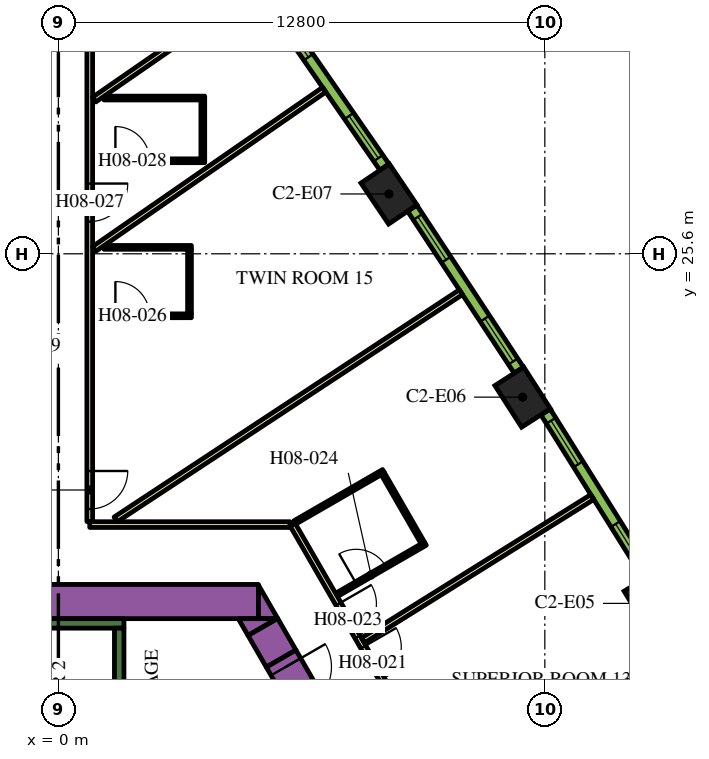
"""IFC4 building model, lengths in metres.
Left out: names, types, materials, properties, quantities, classifications, styles, units other than length and angle.
Written with IfcOpenShell. Run it as: python <this file> out.ifc"""

import sys

from ifc_helpers import new_model, si_unit, direction, frame, frame_2d, origin, origin_2d, place, context, subcontext, project, spatial, polyline, rectangle, outline, extrude, element, fill, save


model = new_model("IFC4")
c1 = context("Model", 3, precision=1e-05, world=origin(), true_north=direction((0.0, 1.0)))
c2 = subcontext(c1, "Body", "Model", "MODEL_VIEW")
j1 = project(units=[si_unit("LENGTHUNIT", "METRE"), si_unit("PLANEANGLEUNIT", "RADIAN")], contexts=[c1])
p1 = place(None, origin())
s1 = spatial("IfcSite", under=j1, at=p1, CompositionType="ELEMENT")
p2 = place(p1, origin())
s2 = spatial("IfcBuilding", under=s1, at=p2, CompositionType="ELEMENT")
p3 = place(p2, frame((0.0, 0.0, 111.0)))
s3 = spatial("IfcBuildingStorey", under=s2, at=p3, CompositionType="ELEMENT", Elevation=111.0)
for number, where, z_axis, x_axis in (
    (1, (15.609, 16.402, 0.0), (0.0, 0.0, 1.0), (-0.52, 0.854, 0.0)),
    (2, (12.217, 21.828, 0.0), (0.0, 0.0, 1.0), (-0.54, 0.842, 0.0)),
    (3, (8.699, 27.174, 0.0), (0.0, 0.0, 1.0), (-0.559, 0.829, 0.0)),
):
    element("IfcColumn", number, at=place(p3, frame(where, z_axis=z_axis, x_axis=x_axis)), inside=s3, PredefinedType="COLUMN", context=c2, shape_type="SweptSolid", body=[
        extrude(rectangle(XDim=1.3, YDim=0.9, at=origin_2d()), origin(), (0.0, 0.0, 1.0), 3.9),
    ])
p4 = place(p3, frame((-4.224, 16.45, 0.0), z_axis=(0.0, 0.0, 1.0), x_axis=(1.0, 0.0, 0.0)))
e4 = element("IfcWall", 4, at=p4, inside=s3, PredefinedType="SOLIDWALL", context=c2, shape_type="SweptSolid", body=[
    extrude(rectangle(XDim=9.488, YDim=0.9, at=frame_2d((4.744, 0.0))), origin(), (0.0, 0.0, 1.0), 3.9),
])
p5 = place(p3, origin())
e5 = element("IfcWall", 5, at=p5, inside=s3, PredefinedType="SOLIDWALL", context=c2, shape_type="SweptSolid", body=[
    extrude(outline(polyline([(5.265, 16.0), (5.265, 16.88), (5.773, 16.0), (5.265, 16.0)])), origin(), (0.0, 0.0, 1.0), 3.9),
])
p6 = place(p3, frame((5.861, 14.949, 0.0), z_axis=(0.0, 0.0, 1.0), x_axis=(-0.50011719232, 0.865957732194, 0.0)))
e6 = element("IfcWall", 6, at=p6, inside=s3, PredefinedType="SOLIDWALL", context=c2, shape_type="SweptSolid", body=[
    extrude(rectangle(XDim=0.964, YDim=0.9, at=frame_2d((0.482, 0.0))), origin(), (0.0, 0.0, 1.0), 3.9),
])
e7 = element("IfcWall", 7, at=p5, inside=s3, PredefinedType="SOLIDWALL", context=c2, shape_type="SweptSolid", body=[
    extrude(outline(polyline([(4.734, 16.0), (5.75, 16.0), (4.988, 15.56), (4.734, 16.0)])), origin(), (0.0, 0.0, 1.0), 3.9),
])
p7 = place(p3, frame((-1.725, 15.875, 0.0), z_axis=(0.0, 0.0, 1.0), x_axis=(1.0, 0.0, 0.0)))
e8 = element("IfcWall", 8, at=p7, inside=s3, PredefinedType="SOLIDWALL", context=c2, shape_type="SweptSolid", body=[
    extrude(rectangle(XDim=3.45, YDim=0.25, at=frame_2d((1.725, 0.0))), origin(), (0.0, 0.0, 1.0), 3.9),
])
p8 = place(p3, frame((1.6, 8.95, 0.0), z_axis=(0.0, 0.0, 1.0), x_axis=(0.0, 1.0, 0.0)))
e9 = element("IfcWall", 9, at=p8, inside=s3, PredefinedType="SOLIDWALL", context=c2, shape_type="SweptSolid", body=[
    extrude(rectangle(XDim=6.8, YDim=0.25, at=frame_2d((3.4, 0.0))), origin(), (0.0, 0.0, 1.0), 3.9),
])
p9 = place(p3, frame((5.861, 14.948, 0.0), z_axis=(0.0, 0.0, 1.0), x_axis=(0.500062241894, -0.865989465428, 0.0)))
e10 = element("IfcWall", 10, at=p9, inside=s3, PredefinedType="SOLIDWALL", context=c2, shape_type="SweptSolid", body=[
    extrude(rectangle(XDim=1.7, YDim=0.9, at=frame_2d((0.85, 0.0))), origin(), (0.0, 0.0, 1.0), 3.9),
])
p10 = place(p9, frame((0.25, 0.0, 0.0)))
e11 = element("IfcOpeningElement", 11, at=p10, cuts=e10, PredefinedType="OPENING", context=c2, shape_type="SweptSolid", body=[
    extrude(rectangle(XDim=1.2, YDim=2.1, at=frame_2d((0.6, 1.05))), frame((0.0, 0.46, 0.0), z_axis=(0.0, -1.0, 0.0), x_axis=(1.0, 0.0, 0.0)), (0.0, 0.0, 1.0), 0.92),
])
p11 = place(p3, frame((6.163, 18.475, 0.0), z_axis=(0.0, 0.0, 1.0), x_axis=(0.500001317485, -0.866024643133, 0.0)))
e12 = element("IfcWall", 12, at=p11, inside=s3, PredefinedType="PARTITIONING", context=c2, shape_type="SweptSolid", body=[
    extrude(rectangle(XDim=25.767, YDim=0.15, at=frame_2d((12.883, 0.0))), origin(), (0.0, 0.0, 1.0), 2.75),
])
p12 = place(p11, frame((24.241, 0.0, 0.0)))
e13 = element("IfcOpeningElement", 13, at=p12, cuts=e12, PredefinedType="OPENING", context=c2, shape_type="SweptSolid", body=[
    extrude(rectangle(XDim=1.0, YDim=2.1, at=frame_2d((0.5, 1.05))), frame((0.0, 0.085, 0.0), z_axis=(0.0, -1.0, 0.0), x_axis=(1.0, 0.0, 0.0)), (0.0, 0.0, 1.0), 0.17),
])
p13 = place(p11, frame((13.144, 0.0, 0.0)))
e14 = element("IfcOpeningElement", 14, at=p13, cuts=e12, PredefinedType="OPENING", context=c2, shape_type="SweptSolid", body=[
    extrude(rectangle(XDim=1.0, YDim=2.1, at=frame_2d((0.5, 1.05))), frame((0.0, 0.085, 0.0), z_axis=(0.0, -1.0, 0.0), x_axis=(1.0, 0.0, 0.0)), (0.0, 0.0, 1.0), 0.17),
])
p14 = place(p11, frame((10.874, 0.0, 0.0)))
e15 = element("IfcOpeningElement", 15, at=p14, cuts=e12, PredefinedType="OPENING", context=c2, shape_type="SweptSolid", body=[
    extrude(rectangle(XDim=0.9, YDim=2.1, at=frame_2d((0.45, 1.05))), frame((0.0, 0.085, 0.0), z_axis=(0.0, -1.0, 0.0), x_axis=(1.0, 0.0, 0.0)), (0.0, 0.0, 1.0), 0.17),
])
p15 = place(p11, frame((3.718, 0.0, 0.0)))
e16 = element("IfcOpeningElement", 16, at=p15, cuts=e12, PredefinedType="OPENING", context=c2, shape_type="SweptSolid", body=[
    extrude(rectangle(XDim=1.0, YDim=2.1, at=frame_2d((0.5, 1.05))), frame((0.0, 0.085, 0.0), z_axis=(0.0, -1.0, 0.0), x_axis=(1.0, 0.0, 0.0)), (0.0, 0.0, 1.0), 0.17),
])
p16 = place(p11, frame((2.411, 0.0, 0.0)))
e17 = element("IfcOpeningElement", 17, at=p16, cuts=e12, PredefinedType="OPENING", context=c2, shape_type="SweptSolid", body=[
    extrude(rectangle(XDim=1.0, YDim=2.1, at=frame_2d((0.5, 1.05))), frame((0.0, 0.085, 0.0), z_axis=(0.0, -1.0, 0.0), x_axis=(1.0, 0.0, 0.0)), (0.0, 0.0, 1.0), 0.17),
])
p17 = place(p3, frame((0.825, 18.475, 0.0), z_axis=(0.0, 0.0, 1.0), x_axis=(1.0, 0.0, 0.0)))
e18 = element("IfcWall", 18, at=p17, inside=s3, PredefinedType="PARTITIONING", context=c2, shape_type="SweptSolid", body=[
    extrude(rectangle(XDim=5.268, YDim=0.15, at=frame_2d((2.634, 0.0))), origin(), (0.0, 0.0, 1.0), 2.75),
])
p18 = place(p3, frame((0.825, 32.098, 0.0), z_axis=(0.0, 0.0, 1.0), x_axis=(0.0, -1.0, 0.0)))
e19 = element("IfcWall", 19, at=p18, inside=s3, PredefinedType="PARTITIONING", context=c2, shape_type="SweptSolid", body=[
    extrude(rectangle(XDim=13.543, YDim=0.15, at=frame_2d((6.772, 0.0))), origin(), (0.0, 0.0, 1.0), 2.75),
])
p19 = place(p18, frame((12.213, 0.0, 0.0)))
e20 = element("IfcOpeningElement", 20, at=p19, cuts=e19, PredefinedType="OPENING", context=c2, shape_type="SweptSolid", body=[
    extrude(rectangle(XDim=1.0, YDim=2.1, at=frame_2d((0.5, 1.05))), frame((0.0, 0.085, 0.0), z_axis=(0.0, -1.0, 0.0), x_axis=(1.0, 0.0, 0.0)), (0.0, 0.0, 1.0), 0.17),
])
p20 = place(p18, frame((4.65, 0.0, 0.0)))
e21 = element("IfcOpeningElement", 21, at=p20, cuts=e19, PredefinedType="OPENING", context=c2, shape_type="SweptSolid", body=[
    extrude(rectangle(XDim=1.0, YDim=2.1, at=frame_2d((0.5, 1.05))), frame((0.0, 0.085, 0.0), z_axis=(0.0, -1.0, 0.0), x_axis=(1.0, 0.0, 0.0)), (0.0, 0.0, 1.0), 0.17),
])
p21 = place(p3, frame((6.994, 29.917, 0.0), z_axis=(0.0, 0.0, 1.0), x_axis=(-0.822255462494, -0.569118576747, 0.0)))
e22 = element("IfcWall", 22, at=p21, inside=s3, PredefinedType="PARTITIONING", context=c2, shape_type="SweptSolid", body=[
    extrude(rectangle(XDim=7.362, YDim=0.15, at=frame_2d((3.681, 0.0))), origin(), (0.0, 0.0, 1.0), 2.75),
])
p22 = place(p3, frame((10.592, 24.589, 0.0), z_axis=(0.0, 0.0, 1.0), x_axis=(-0.835337323748, -0.549737715236, 0.0)))
e23 = element("IfcWall", 23, at=p22, inside=s3, PredefinedType="PARTITIONING", context=c2, shape_type="SweptSolid", body=[
    extrude(rectangle(XDim=10.875, YDim=0.15, at=frame_2d((5.438, 0.0))), origin(), (0.0, 0.0, 1.0), 2.75),
])
p23 = place(p3, frame((4.649, 32.223, 0.0), z_axis=(0.0, 0.0, 1.0), x_axis=(-0.822262349475, -0.569108626394, 0.0)))
e24 = element("IfcWall", 24, at=p23, inside=s3, PredefinedType="PARTITIONING", context=c2, shape_type="SweptSolid", body=[
    extrude(rectangle(XDim=4.51, YDim=0.15, at=frame_2d((2.255, 0.0))), origin(), (0.0, 0.0, 1.0), 2.75),
])
p24 = place(p3, frame((14.049, 19.2, 0.0), z_axis=(0.0, 0.0, 1.0), x_axis=(-0.847955867271, -0.530066832731, 0.0)))
e25 = element("IfcWall", 25, at=p24, inside=s3, PredefinedType="PARTITIONING", context=c2, shape_type="SweptSolid", body=[
    extrude(rectangle(XDim=7.111, YDim=0.15, at=frame_2d((3.556, 0.0))), origin(), (0.0, 0.0, 1.0), 2.75),
])
p25 = place(p3, frame((7.318, 16.625, 0.0), z_axis=(0.0, 0.0, 1.0), x_axis=(0.866019956843, 0.50000943426, 0.0)))
e26 = element("IfcWall", 26, at=p25, inside=s3, PredefinedType="PARTITIONING", context=c2, shape_type="SweptSolid", body=[
    extrude(rectangle(XDim=2.7, YDim=0.1, at=frame_2d((1.35, 0.0))), origin(), (0.0, 0.0, 1.0), 2.75),
])
p26 = place(p25, frame((0.6, 0.0, 0.0)))
e27 = element("IfcOpeningElement", 27, at=p26, cuts=e26, PredefinedType="OPENING", context=c2, shape_type="SweptSolid", body=[
    extrude(rectangle(XDim=0.9, YDim=2.1, at=frame_2d((0.45, 1.05))), frame((0.0, 0.06, 0.0), z_axis=(0.0, -1.0, 0.0), x_axis=(1.0, 0.0, 0.0)), (0.0, 0.0, 1.0), 0.12),
])
p27 = place(p3, frame((9.588, 17.993, 0.0), z_axis=(0.0, 0.0, 1.0), x_axis=(-0.500027713859, 0.866009402589, 0.0)))
e28 = element("IfcWall", 28, at=p27, inside=s3, PredefinedType="PARTITIONING", context=c2, shape_type="SweptSolid", body=[
    extrude(rectangle(XDim=2.1, YDim=0.1, at=frame_2d((1.05, 0.0))), origin(), (0.0, 0.0, 1.0), 2.75),
])
p28 = place(p3, frame((6.218, 18.53, 0.0), z_axis=(0.0, 0.0, 1.0), x_axis=(0.86599734893, 0.500048589285, 0.0)))
e29 = element("IfcWall", 29, at=p28, inside=s3, PredefinedType="PARTITIONING", context=c2, shape_type="SweptSolid", body=[
    extrude(rectangle(XDim=2.7, YDim=0.1, at=frame_2d((1.35, 0.0))), origin(), (0.0, 0.0, 1.0), 2.75),
])
p29 = place(p3, frame((0.9, 23.969, 0.0), z_axis=(0.0, 0.0, 1.0), x_axis=(1.0, 0.0, 0.0)))
e30 = element("IfcWall", 30, at=p29, inside=s3, PredefinedType="PARTITIONING", context=c2, shape_type="SweptSolid", body=[
    extrude(rectangle(XDim=2.6, YDim=0.1, at=frame_2d((1.3, 0.0))), origin(), (0.0, 0.0, 1.0), 2.75),
])
p30 = place(p29, frame((0.6, 0.0, 0.0)))
e31 = element("IfcOpeningElement", 31, at=p30, cuts=e30, PredefinedType="OPENING", context=c2, shape_type="SweptSolid", body=[
    extrude(rectangle(XDim=0.9, YDim=2.1, at=frame_2d((0.45, 1.05))), frame((0.0, 0.06, 0.0), z_axis=(0.0, -1.0, 0.0), x_axis=(1.0, 0.0, 0.0)), (0.0, 0.0, 1.0), 0.12),
])
p31 = place(p3, frame((3.45, 24.019, 0.0), z_axis=(0.0, 0.0, 1.0), x_axis=(0.0, 1.0, 0.0)))
e32 = element("IfcWall", 32, at=p31, inside=s3, PredefinedType="PARTITIONING", context=c2, shape_type="SweptSolid", body=[
    extrude(rectangle(XDim=1.7, YDim=0.1, at=frame_2d((0.85, 0.0))), origin(), (0.0, 0.0, 1.0), 2.75),
])
p32 = place(p3, frame((1.2, 25.769, 0.0), z_axis=(0.0, 0.0, 1.0), x_axis=(1.0, 0.0, 0.0)))
e33 = element("IfcWall", 33, at=p32, inside=s3, PredefinedType="PARTITIONING", context=c2, shape_type="SweptSolid", body=[
    extrude(rectangle(XDim=2.3, YDim=0.1, at=frame_2d((1.15, 0.0))), origin(), (0.0, 0.0, 1.0), 2.75),
])
p33 = place(p3, frame((0.9, 28.048, 0.0), z_axis=(0.0, 0.0, 1.0), x_axis=(1.0, 0.0, 0.0)))
e34 = element("IfcWall", 34, at=p33, inside=s3, PredefinedType="PARTITIONING", context=c2, shape_type="SweptSolid", body=[
    extrude(rectangle(XDim=2.95, YDim=0.1, at=frame_2d((1.475, 0.0))), origin(), (0.0, 0.0, 1.0), 2.75),
])
p34 = place(p33, frame((0.6, 0.0, 0.0)))
e35 = element("IfcOpeningElement", 35, at=p34, cuts=e34, PredefinedType="OPENING", context=c2, shape_type="SweptSolid", body=[
    extrude(rectangle(XDim=0.9, YDim=2.1, at=frame_2d((0.45, 1.05))), frame((0.0, 0.06, 0.0), z_axis=(0.0, -1.0, 0.0), x_axis=(1.0, 0.0, 0.0)), (0.0, 0.0, 1.0), 0.12),
])
p35 = place(p3, frame((3.8, 28.098, 0.0), z_axis=(0.0, 0.0, 1.0), x_axis=(0.0, 1.0, 0.0)))
e36 = element("IfcWall", 36, at=p35, inside=s3, PredefinedType="PARTITIONING", context=c2, shape_type="SweptSolid", body=[
    extrude(rectangle(XDim=1.55, YDim=0.1, at=frame_2d((0.775, 0.0))), origin(), (0.0, 0.0, 1.0), 2.75),
])
p36 = place(p3, frame((1.2, 29.698, 0.0), z_axis=(0.0, 0.0, 1.0), x_axis=(1.0, 0.0, 0.0)))
e37 = element("IfcWall", 37, at=p36, inside=s3, PredefinedType="PARTITIONING", context=c2, shape_type="SweptSolid", body=[
    extrude(rectangle(XDim=2.65, YDim=0.1, at=frame_2d((1.325, 0.0))), origin(), (0.0, 0.0, 1.0), 2.75),
])
p37 = place(p3, frame((15.524, 17.114, 0.0), z_axis=(0.0, 0.0, 1.0), x_axis=(-0.530072082134, 0.847952585787, 0.0)))
e38 = element("IfcWall", 38, at=p37, inside=s3, PredefinedType="SOLIDWALL", context=c2, shape_type="SweptSolid", body=[
    extrude(rectangle(XDim=5.1, YDim=0.29, at=frame_2d((2.55, 0.0))), origin(), (0.0, 0.0, 1.0), 3.65),
])
p38 = place(p37, frame((0.273, 0.0, 0.9)))
e39 = element("IfcOpeningElement", 39, at=p38, cuts=e38, PredefinedType="OPENING", context=c2, shape_type="SweptSolid", body=[
    extrude(rectangle(XDim=1.35, YDim=2.15, at=frame_2d((0.675, 1.075))), frame((0.0, 0.155, 0.0), z_axis=(0.0, -1.0, 0.0), x_axis=(1.0, 0.0, 0.0)), (0.0, 0.0, 1.0), 0.31),
])
p39 = place(p37, frame((3.478, 0.0, 0.9)))
e40 = element("IfcOpeningElement", 40, at=p39, cuts=e38, PredefinedType="OPENING", context=c2, shape_type="SweptSolid", body=[
    extrude(rectangle(XDim=1.35, YDim=2.15, at=frame_2d((0.675, 1.075))), frame((0.0, 0.155, 0.0), z_axis=(0.0, -1.0, 0.0), x_axis=(1.0, 0.0, 0.0)), (0.0, 0.0, 1.0), 0.31),
])
p40 = place(p3, frame((12.115, 22.539, 0.0), z_axis=(0.0, 0.0, 1.0), x_axis=(-0.549741341923, 0.835334937005, 0.0)))
e41 = element("IfcWall", 41, at=p40, inside=s3, PredefinedType="SOLIDWALL", context=c2, shape_type="SweptSolid", body=[
    extrude(rectangle(XDim=5.1, YDim=0.29, at=frame_2d((2.55, 0.0))), origin(), (0.0, 0.0, 1.0), 3.65),
])
p41 = place(p40, frame((0.273, 0.0, 0.9)))
e42 = element("IfcOpeningElement", 42, at=p41, cuts=e41, PredefinedType="OPENING", context=c2, shape_type="SweptSolid", body=[
    extrude(rectangle(XDim=1.35, YDim=2.15, at=frame_2d((0.675, 1.075))), frame((0.0, 0.155, 0.0), z_axis=(0.0, -1.0, 0.0), x_axis=(1.0, 0.0, 0.0)), (0.0, 0.0, 1.0), 0.31),
])
p42 = place(p40, frame((3.478, 0.0, 0.9)))
e43 = element("IfcOpeningElement", 43, at=p42, cuts=e41, PredefinedType="OPENING", context=c2, shape_type="SweptSolid", body=[
    extrude(rectangle(XDim=1.35, YDim=2.15, at=frame_2d((0.675, 1.075))), frame((0.0, 0.155, 0.0), z_axis=(0.0, -1.0, 0.0), x_axis=(1.0, 0.0, 0.0)), (0.0, 0.0, 1.0), 0.31),
])
p43 = place(p3, frame((8.58, 27.882, 0.0), z_axis=(0.0, 0.0, 1.0), x_axis=(-0.569113019126, 0.822259309136, 0.0)))
e44 = element("IfcWall", 44, at=p43, inside=s3, PredefinedType="SOLIDWALL", context=c2, shape_type="SweptSolid", body=[
    extrude(rectangle(XDim=5.107, YDim=0.29, at=frame_2d((2.553, 0.0))), origin(), (0.0, 0.0, 1.0), 3.65),
])
p44 = place(p43, frame((0.285, 0.0, 0.9)))
e45 = element("IfcOpeningElement", 45, at=p44, cuts=e44, PredefinedType="OPENING", context=c2, shape_type="SweptSolid", body=[
    extrude(rectangle(XDim=1.35, YDim=2.15, at=frame_2d((0.675, 1.075))), frame((0.0, 0.155, 0.0), z_axis=(0.0, -1.0, 0.0), x_axis=(1.0, 0.0, 0.0)), (0.0, 0.0, 1.0), 0.31),
])
p45 = place(p43, frame((3.516, 0.0, 0.9)))
e46 = element("IfcOpeningElement", 46, at=p45, cuts=e44, PredefinedType="OPENING", context=c2, shape_type="SweptSolid", body=[
    extrude(rectangle(XDim=1.35, YDim=2.15, at=frame_2d((0.675, 1.075))), frame((0.0, 0.155, 0.0), z_axis=(0.0, -1.0, 0.0), x_axis=(1.0, 0.0, 0.0)), (0.0, 0.0, 1.0), 0.31),
])
p46 = place(p10, origin())
e47 = element("IfcDoor", 47, at=p46, inside=s3, OperationType="SINGLE_SWING_LEFT", PredefinedType="DOOR", context=c2, shape_type="SweptSolid", body=[
    extrude(rectangle(XDim=1.2, YDim=2.1, at=frame_2d((0.6, 1.05))), frame((0.0, 0.025, 0.0), z_axis=(0.0, -1.0, 0.0), x_axis=(1.0, 0.0, 0.0)), (0.0, 0.0, 1.0), 0.05),
])
fill(e11, e47)
p47 = place(p15, origin())
e48 = element("IfcDoor", 48, at=p47, inside=s3, OperationType="SINGLE_SWING_LEFT", PredefinedType="DOOR", context=c2, shape_type="SweptSolid", body=[
    extrude(rectangle(XDim=1.0, YDim=2.1, at=frame_2d((0.5, 1.05))), frame((0.0, 0.025, 0.0), z_axis=(0.0, -1.0, 0.0), x_axis=(1.0, 0.0, 0.0)), (0.0, 0.0, 1.0), 0.05),
])
fill(e16, e48)
p48 = place(p16, origin())
e49 = element("IfcDoor", 49, at=p48, inside=s3, OperationType="SINGLE_SWING_RIGHT", PredefinedType="DOOR", context=c2, shape_type="SweptSolid", body=[
    extrude(rectangle(XDim=1.0, YDim=2.1, at=frame_2d((0.5, 1.05))), frame((0.0, 0.025, 0.0), z_axis=(0.0, -1.0, 0.0), x_axis=(1.0, 0.0, 0.0)), (0.0, 0.0, 1.0), 0.05),
])
fill(e17, e49)
p49 = place(p26, origin())
e50 = element("IfcDoor", 50, at=p49, inside=s3, OperationType="SINGLE_SWING_LEFT", PredefinedType="DOOR", context=c2, shape_type="SweptSolid", body=[
    extrude(rectangle(XDim=0.9, YDim=2.1, at=frame_2d((0.45, 1.05))), frame((0.0, 0.025, 0.0), z_axis=(0.0, -1.0, 0.0), x_axis=(1.0, 0.0, 0.0)), (0.0, 0.0, 1.0), 0.05),
])
fill(e27, e50)
p50 = place(p19, origin())
e51 = element("IfcDoor", 51, at=p50, inside=s3, OperationType="SINGLE_SWING_RIGHT", PredefinedType="DOOR", context=c2, shape_type="SweptSolid", body=[
    extrude(rectangle(XDim=1.0, YDim=2.1, at=frame_2d((0.5, 1.05))), frame((0.0, 0.025, 0.0), z_axis=(0.0, -1.0, 0.0), x_axis=(1.0, 0.0, 0.0)), (0.0, 0.0, 1.0), 0.05),
])
fill(e20, e51)
p51 = place(p30, origin())
e52 = element("IfcDoor", 52, at=p51, inside=s3, OperationType="SINGLE_SWING_RIGHT", PredefinedType="DOOR", context=c2, shape_type="SweptSolid", body=[
    extrude(rectangle(XDim=0.9, YDim=2.1, at=frame_2d((0.45, 1.05))), frame((0.0, 0.025, 0.0), z_axis=(0.0, -1.0, 0.0), x_axis=(1.0, 0.0, 0.0)), (0.0, 0.0, 1.0), 0.05),
])
fill(e31, e52)
p52 = place(p20, origin())
e53 = element("IfcDoor", 53, at=p52, inside=s3, OperationType="SINGLE_SWING_RIGHT", PredefinedType="DOOR", context=c2, shape_type="SweptSolid", body=[
    extrude(rectangle(XDim=1.0, YDim=2.1, at=frame_2d((0.5, 1.05))), frame((0.0, 0.025, 0.0), z_axis=(0.0, -1.0, 0.0), x_axis=(1.0, 0.0, 0.0)), (0.0, 0.0, 1.0), 0.05),
])
fill(e21, e53)
p53 = place(p34, origin())
e54 = element("IfcDoor", 54, at=p53, inside=s3, OperationType="SINGLE_SWING_LEFT", PredefinedType="DOOR", context=c2, shape_type="SweptSolid", body=[
    extrude(rectangle(XDim=0.9, YDim=2.1, at=frame_2d((0.45, 1.05))), frame((0.0, 0.025, 0.0), z_axis=(0.0, -1.0, 0.0), x_axis=(1.0, 0.0, 0.0)), (0.0, 0.0, 1.0), 0.05),
])
fill(e35, e54)
p54 = place(p38, origin())
e55 = element("IfcWindow", 55, at=p54, inside=s3, PartitioningType="DOUBLE_PANEL_VERTICAL", PredefinedType="WINDOW", context=c2, shape_type="SweptSolid", body=[
    extrude(rectangle(XDim=1.35, YDim=2.15, at=frame_2d((0.675, 1.075))), frame((0.0, 0.015, 0.0), z_axis=(0.0, -1.0, 0.0), x_axis=(1.0, 0.0, 0.0)), (0.0, 0.0, 1.0), 0.06),
])
fill(e39, e55)
p55 = place(p39, origin())
e56 = element("IfcWindow", 56, at=p55, inside=s3, PartitioningType="DOUBLE_PANEL_VERTICAL", PredefinedType="WINDOW", context=c2, shape_type="SweptSolid", body=[
    extrude(rectangle(XDim=1.35, YDim=2.15, at=frame_2d((0.675, 1.075))), frame((0.0, 0.015, 0.0), z_axis=(0.0, -1.0, 0.0), x_axis=(1.0, 0.0, 0.0)), (0.0, 0.0, 1.0), 0.06),
])
fill(e40, e56)
p56 = place(p41, origin())
e57 = element("IfcWindow", 57, at=p56, inside=s3, PartitioningType="DOUBLE_PANEL_VERTICAL", PredefinedType="WINDOW", context=c2, shape_type="SweptSolid", body=[
    extrude(rectangle(XDim=1.35, YDim=2.15, at=frame_2d((0.675, 1.075))), frame((0.0, 0.015, 0.0), z_axis=(0.0, -1.0, 0.0), x_axis=(1.0, 0.0, 0.0)), (0.0, 0.0, 1.0), 0.06),
])
fill(e42, e57)
p57 = place(p42, origin())
e58 = element("IfcWindow", 58, at=p57, inside=s3, PartitioningType="DOUBLE_PANEL_VERTICAL", PredefinedType="WINDOW", context=c2, shape_type="SweptSolid", body=[
    extrude(rectangle(XDim=1.35, YDim=2.15, at=frame_2d((0.675, 1.075))), frame((0.0, 0.015, 0.0), z_axis=(0.0, -1.0, 0.0), x_axis=(1.0, 0.0, 0.0)), (0.0, 0.0, 1.0), 0.06),
])
fill(e43, e58)
p58 = place(p44, origin())
e59 = element("IfcWindow", 59, at=p58, inside=s3, PartitioningType="DOUBLE_PANEL_VERTICAL", PredefinedType="WINDOW", context=c2, shape_type="SweptSolid", body=[
    extrude(rectangle(XDim=1.35, YDim=2.15, at=frame_2d((0.675, 1.075))), frame((0.0, 0.015, 0.0), z_axis=(0.0, -1.0, 0.0), x_axis=(1.0, 0.0, 0.0)), (0.0, 0.0, 1.0), 0.06),
])
fill(e45, e59)
p59 = place(p45, origin())
e60 = element("IfcWindow", 60, at=p59, inside=s3, PartitioningType="DOUBLE_PANEL_VERTICAL", PredefinedType="WINDOW", context=c2, shape_type="SweptSolid", body=[
    extrude(rectangle(XDim=1.35, YDim=2.15, at=frame_2d((0.675, 1.075))), frame((0.0, 0.015, 0.0), z_axis=(0.0, -1.0, 0.0), x_axis=(1.0, 0.0, 0.0)), (0.0, 0.0, 1.0), 0.06),
])
fill(e46, e60)
save(model, sys.argv[1])
